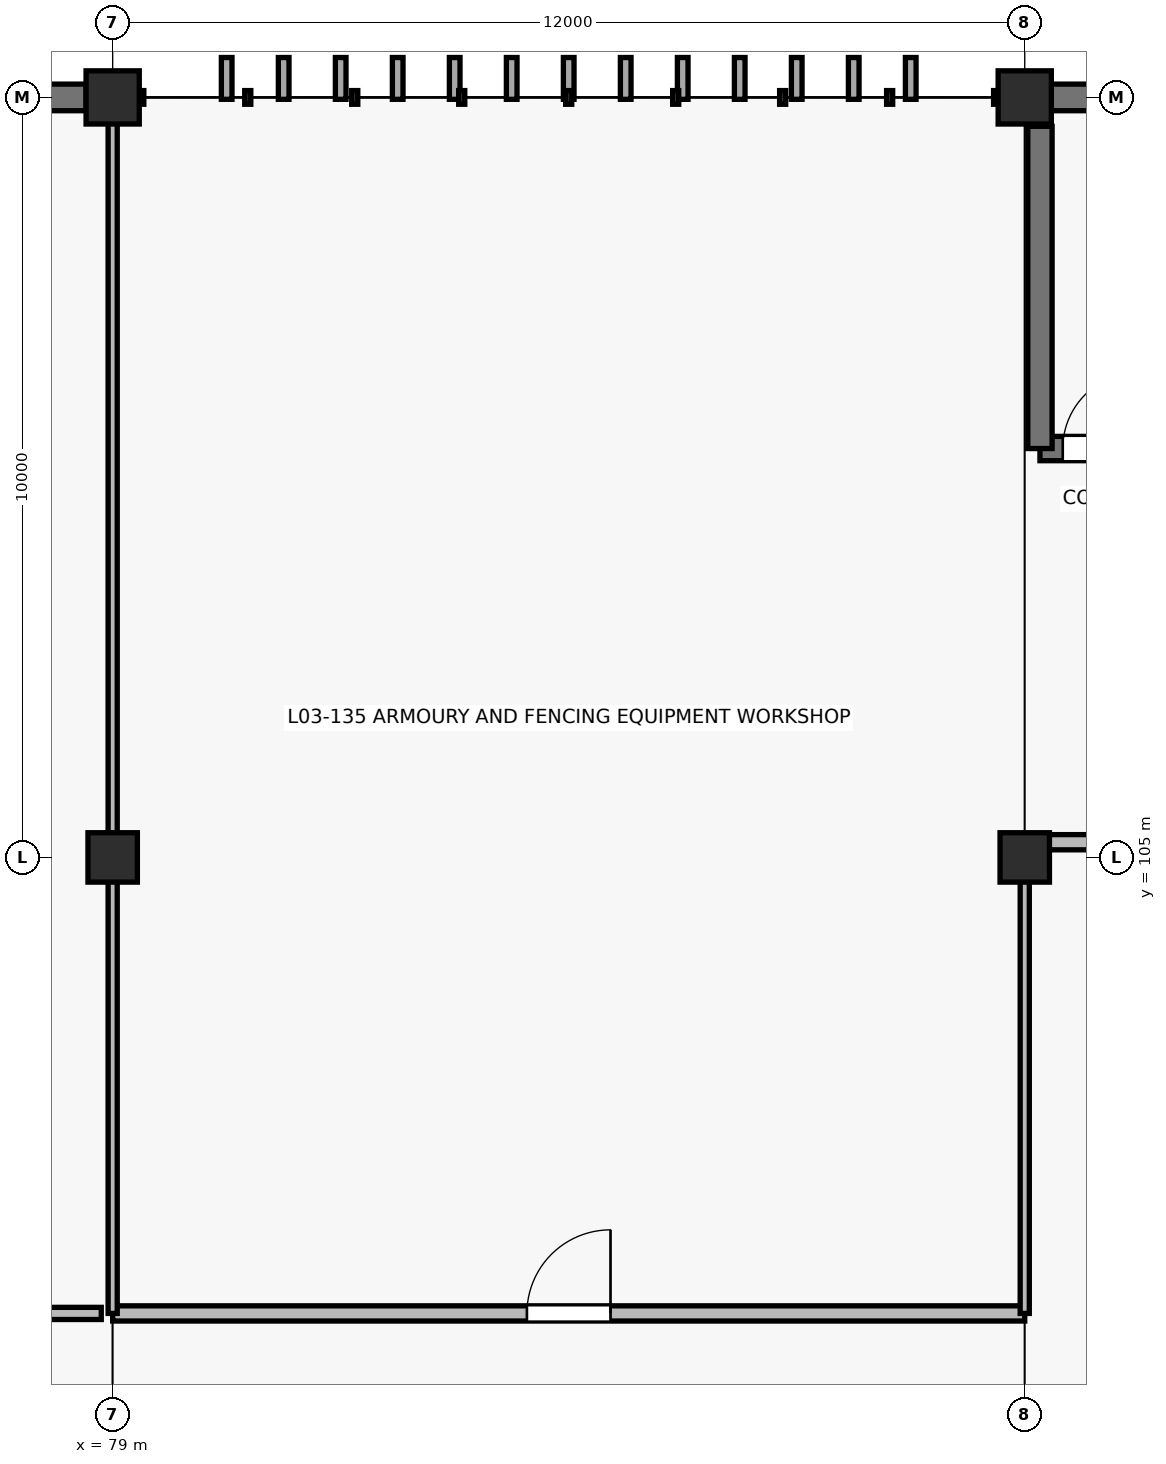
"""IFC4 building model, lengths in metres.
Left out: names, types, materials, properties, quantities, classifications, styles, units other than length and angle.
Written with IfcOpenShell. Run it as: python <this file> out.ifc"""

import sys

from ifc_helpers import new_model, si_unit, direction, frame, frame_2d, origin, origin_2d, place, context, subcontext, project, spatial, rectangle, circle, extrude, element, fill, save


model = new_model("IFC4")
c1 = context("Model", 3, precision=1e-05, world=origin(), true_north=direction((0.0, 1.0)))
c2 = subcontext(c1, "Body", "Model", "MODEL_VIEW")
j1 = project(units=[si_unit("LENGTHUNIT", "METRE"), si_unit("PLANEANGLEUNIT", "RADIAN")], contexts=[c1])
p1 = place(None, origin())
s1 = spatial("IfcSite", under=j1, at=p1, CompositionType="ELEMENT")
p2 = place(p1, origin())
s2 = spatial("IfcBuilding", under=s1, at=p2, CompositionType="ELEMENT")
p3 = place(p2, frame((0.0, 0.0, 13.2)))
s3 = spatial("IfcBuildingStorey", under=s2, at=p3, CompositionType="ELEMENT", Elevation=13.2)
p4 = place(p3, frame((79.0, 105.0, 0.0), z_axis=(0.0, 0.0, 1.0), x_axis=(1.0, 0.0, 0.0)))
e1 = element("IfcColumn", 1, at=p4, inside=s3, PredefinedType="COLUMN", context=c2, shape_type="SweptSolid", body=[
    extrude(rectangle(XDim=0.65, YDim=0.65, at=origin_2d()), origin(), (0.0, 0.0, 1.0), 4.2),
])
p5 = place(p3, frame((79.0, 115.0, 0.0), z_axis=(0.0, 0.0, 1.0), x_axis=(1.0, 0.0, 0.0)))
e2 = element("IfcColumn", 2, at=p5, inside=s3, PredefinedType="COLUMN", context=c2, shape_type="SweptSolid", body=[
    extrude(circle(Radius=0.35, at=origin_2d()), origin(), (0.0, 0.0, 1.0), 4.2),
])
p6 = place(p3, frame((91.0, 105.0, 0.0), z_axis=(0.0, 0.0, 1.0), x_axis=(1.0, 0.0, 0.0)))
e3 = element("IfcColumn", 3, at=p6, inside=s3, PredefinedType="COLUMN", context=c2, shape_type="SweptSolid", body=[
    extrude(rectangle(XDim=0.65, YDim=0.65, at=origin_2d()), origin(), (0.0, 0.0, 1.0), 4.2),
])
p7 = place(p3, frame((91.0, 115.0, 0.0), z_axis=(0.0, 0.0, 1.0), x_axis=(1.0, 0.0, 0.0)))
e4 = element("IfcColumn", 4, at=p7, inside=s3, PredefinedType="COLUMN", context=c2, shape_type="SweptSolid", body=[
    extrude(circle(Radius=0.35, at=origin_2d()), origin(), (0.0, 0.0, 1.0), 4.2),
])
p8 = place(p3, frame((67.35, 115.0, 0.0), z_axis=(0.0, 0.0, 1.0), x_axis=(1.0, 0.0, 0.0)))
e5 = element("IfcWall", 5, at=p8, inside=s3, PredefinedType="SOLIDWALL", context=c2, shape_type="SweptSolid", body=[
    extrude(rectangle(XDim=11.3, YDim=0.35, at=frame_2d((5.65, 0.0))), origin(), (0.0, 0.0, 1.0), 4.2),
])
p9 = place(p8, frame((2.2, 0.0, 1.0)))
e6 = element("IfcOpeningElement", 6, at=p9, cuts=e5, PredefinedType="OPENING", context=c2, shape_type="SweptSolid", body=[
    extrude(rectangle(XDim=1.8, YDim=1.5, at=frame_2d((0.9, 0.75))), frame((0.0, 0.185, 0.0), z_axis=(0.0, -1.0, 0.0), x_axis=(1.0, 0.0, 0.0)), (0.0, 0.0, 1.0), 0.37),
])
p10 = place(p3, frame((91.35, 115.0, 0.0), z_axis=(0.0, 0.0, 1.0), x_axis=(1.0, 0.0, 0.0)))
e7 = element("IfcWall", 7, at=p10, inside=s3, PredefinedType="SOLIDWALL", context=c2, shape_type="SweptSolid", body=[
    extrude(rectangle(XDim=9.3, YDim=0.35, at=frame_2d((4.65, 0.0))), origin(), (0.0, 0.0, 1.0), 4.2),
])
p11 = place(p10, frame((2.2, 0.0, 1.0)))
e8 = element("IfcOpeningElement", 8, at=p11, cuts=e7, PredefinedType="OPENING", context=c2, shape_type="SweptSolid", body=[
    extrude(rectangle(XDim=2.4, YDim=1.5, at=frame_2d((1.2, 0.75))), frame((0.0, 0.185, 0.0), z_axis=(0.0, -1.0, 0.0), x_axis=(1.0, 0.0, 0.0)), (0.0, 0.0, 1.0), 0.37),
])
p12 = place(p3, frame((74.8, 99.0, 0.0), z_axis=(0.0, 0.0, 1.0), x_axis=(1.0, 0.0, 0.0)))
e9 = element("IfcWall", 9, at=p12, inside=s3, PredefinedType="PARTITIONING", context=c2, shape_type="SweptSolid", body=[
    extrude(rectangle(XDim=4.05, YDim=0.16, at=frame_2d((2.025, 0.0))), origin(), (0.0, 0.0, 1.0), 3.005),
])
p13 = place(p12, frame((0.45, 0.0, 0.0)))
e10 = element("IfcOpeningElement", 10, at=p13, cuts=e9, PredefinedType="OPENING", context=c2, shape_type="SweptSolid", body=[
    extrude(rectangle(XDim=1.0, YDim=2.15, at=frame_2d((0.5, 1.075))), frame((0.0, 0.09, 0.0), z_axis=(0.0, -1.0, 0.0), x_axis=(1.0, 0.0, 0.0)), (0.0, 0.0, 1.0), 0.18),
])
p14 = place(p3, frame((91.2, 110.38, 0.0), z_axis=(0.0, 0.0, 1.0), x_axis=(1.0, 0.0, 0.0)))
e11 = element("IfcWall", 11, at=p14, inside=s3, PredefinedType="SHEAR", context=c2, shape_type="SweptSolid", body=[
    extrude(rectangle(XDim=7.1, YDim=0.32, at=frame_2d((3.55, 0.0))), origin(), (0.0, 0.0, 1.0), 4.2),
])
p15 = place(p14, frame((0.3, 0.0, 0.0)))
e12 = element("IfcOpeningElement", 12, at=p15, cuts=e11, PredefinedType="OPENING", context=c2, shape_type="SweptSolid", body=[
    extrude(rectangle(XDim=1.0, YDim=2.15, at=frame_2d((0.5, 1.075))), frame((0.0, 0.17, 0.0), z_axis=(0.0, -1.0, 0.0), x_axis=(1.0, 0.0, 0.0)), (0.0, 0.0, 1.0), 0.34),
])
p16 = place(p3, frame((91.2, 114.62, 0.0), z_axis=(0.0, 0.0, 1.0), x_axis=(0.0, -1.0, 0.0)))
e13 = element("IfcWall", 13, at=p16, inside=s3, PredefinedType="SHEAR", context=c2, shape_type="SweptSolid", body=[
    extrude(rectangle(XDim=4.24, YDim=0.32, at=frame_2d((2.12, 0.0))), origin(), (0.0, 0.0, 1.0), 4.2),
])
p17 = place(p3, frame((91.2, 105.2, 0.0), z_axis=(0.0, 0.0, 1.0), x_axis=(1.0, 0.0, 0.0)))
e14 = element("IfcWall", 14, at=p17, inside=s3, PredefinedType="PARTITIONING", context=c2, shape_type="SweptSolid", body=[
    extrude(rectangle(XDim=7.1, YDim=0.2, at=frame_2d((3.55, 0.0))), origin(), (0.0, 0.0, 1.0), 3.005),
])
p18 = place(p17, frame((2.2, 0.0, 0.0)))
e15 = element("IfcOpeningElement", 15, at=p18, cuts=e14, PredefinedType="OPENING", context=c2, shape_type="SweptSolid", body=[
    extrude(rectangle(XDim=1.6, YDim=2.2, at=frame_2d((0.8, 1.1))), frame((0.0, 0.11, 0.0), z_axis=(0.0, -1.0, 0.0), x_axis=(1.0, 0.0, 0.0)), (0.0, 0.0, 1.0), 0.22),
])
p19 = place(p3, frame((79.0, 99.0, 0.0), z_axis=(0.0, 0.0, 1.0), x_axis=(1.0, 0.0, 0.0)))
e16 = element("IfcWall", 16, at=p19, inside=s3, PredefinedType="PARTITIONING", context=c2, shape_type="SweptSolid", body=[
    extrude(rectangle(XDim=12.0, YDim=0.2, at=frame_2d((6.0, 0.0))), origin(), (0.0, 0.0, 1.0), 3.005),
])
p20 = place(p19, frame((5.45, 0.0, 0.0)))
e17 = element("IfcOpeningElement", 17, at=p20, cuts=e16, PredefinedType="OPENING", context=c2, shape_type="SweptSolid", body=[
    extrude(rectangle(XDim=1.1, YDim=2.15, at=frame_2d((0.55, 1.075))), frame((0.0, 0.11, 0.0), z_axis=(0.0, -1.0, 0.0), x_axis=(1.0, 0.0, 0.0)), (0.0, 0.0, 1.0), 0.22),
])
p21 = place(p3, frame((79.0, 99.0, 0.0), z_axis=(0.0, 0.0, 1.0), x_axis=(0.0, 1.0, 0.0)))
e18 = element("IfcWall", 18, at=p21, inside=s3, PredefinedType="PARTITIONING", context=c2, shape_type="SweptSolid", body=[
    extrude(rectangle(XDim=15.75, YDim=0.12, at=frame_2d((7.875, 0.0))), origin(), (0.0, 0.0, 1.0), 3.005),
])
p22 = place(p3, frame((91.0, 99.0, 0.0), z_axis=(0.0, 0.0, 1.0), x_axis=(0.0, 1.0, 0.0)))
e19 = element("IfcWall", 19, at=p22, inside=s3, PredefinedType="PARTITIONING", context=c2, shape_type="SweptSolid", body=[
    extrude(rectangle(XDim=6.2, YDim=0.12, at=frame_2d((3.1, 0.0))), origin(), (0.0, 0.0, 1.0), 3.005),
])
p23 = place(p15, origin())
e20 = element("IfcDoor", 20, at=p23, inside=s3, OperationType="SINGLE_SWING_RIGHT", PredefinedType="DOOR", context=c2, shape_type="SweptSolid", body=[
    extrude(rectangle(XDim=1.0, YDim=2.15, at=frame_2d((0.5, 1.075))), frame((0.0, 0.025, 0.0), z_axis=(0.0, -1.0, 0.0), x_axis=(1.0, 0.0, 0.0)), (0.0, 0.0, 1.0), 0.05),
])
fill(e12, e20)
p24 = place(p20, origin())
e21 = element("IfcDoor", 21, at=p24, inside=s3, OperationType="SINGLE_SWING_RIGHT", PredefinedType="DOOR", context=c2, shape_type="SweptSolid", body=[
    extrude(rectangle(XDim=1.1, YDim=2.15, at=frame_2d((0.55, 1.075))), frame((0.0, 0.025, 0.0), z_axis=(0.0, -1.0, 0.0), x_axis=(1.0, 0.0, 0.0)), (0.0, 0.0, 1.0), 0.05),
])
fill(e17, e21)
save(model, sys.argv[1])
